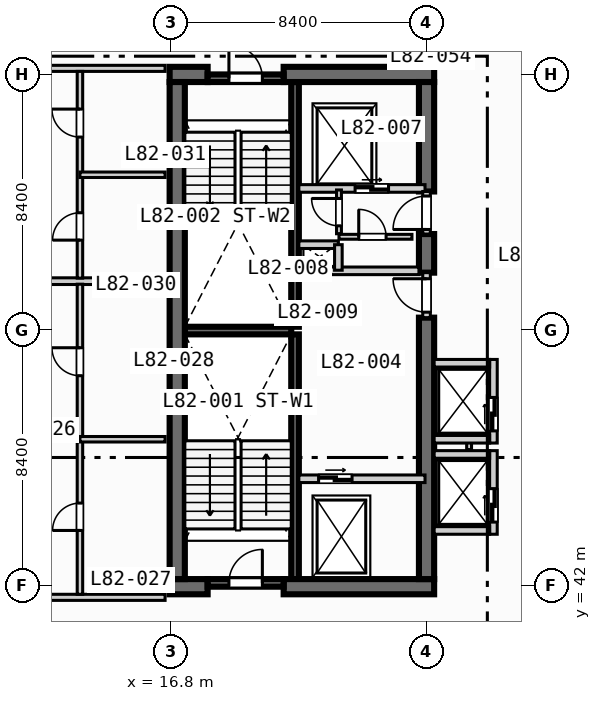
"""IFC4 building model, lengths in metres.
Left out: names, types, materials, properties, quantities, classifications, styles, units other than length and angle.
Written with IfcOpenShell. Run it as: python <this file> out.ifc"""

import sys

from ifc_helpers import new_model, si_unit, direction, frame, frame_2d, origin, place, context, subcontext, project, spatial, rectangle, extrude, element, fill, save


model = new_model("IFC4")
c1 = context("Model", 3, precision=1e-05, world=origin(), true_north=direction((0.0, 1.0)))
c2 = subcontext(c1, "Body", "Model", "MODEL_VIEW")
j1 = project(units=[si_unit("LENGTHUNIT", "METRE"), si_unit("PLANEANGLEUNIT", "RADIAN")], contexts=[c1])
p1 = place(None, origin())
s1 = spatial("IfcSite", under=j1, at=p1, CompositionType="ELEMENT")
p2 = place(p1, origin())
s2 = spatial("IfcBuilding", under=s1, at=p2, CompositionType="ELEMENT")
p3 = place(p2, frame((0.0, 0.0, 332.0)))
s3 = spatial("IfcBuildingStorey", under=s2, at=p3, CompositionType="ELEMENT", Elevation=332.0)
for number, where, z_axis, x_axis in (
    (1, (20.875, 42.2, 0.0), (0.0, 0.0, 1.0), (0.0, 1.0, 0.0)),
    (2, (20.875, 50.5, 0.0), (0.0, 0.0, 1.0), (0.0, 1.0, 0.0)),
):
    element("IfcWall", number, at=place(p3, frame(where, z_axis=z_axis, x_axis=x_axis)), inside=s3, PredefinedType="SOLIDWALL", context=c2, shape_type="SweptSolid", body=[
        extrude(rectangle(XDim=8.05, YDim=0.25, at=frame_2d((4.025, 0.0))), origin(), (0.0, 0.0, 1.0), 3.67),
    ])
p4 = place(p3, frame((17.25, 50.375, 0.0), z_axis=(0.0, 0.0, 1.0), x_axis=(1.0, 0.0, 0.0)))
e3 = element("IfcWall", 3, at=p4, inside=s3, PredefinedType="SOLIDWALL", context=c2, shape_type="SweptSolid", body=[
    extrude(rectangle(XDim=3.5, YDim=0.25, at=frame_2d((1.75, 0.0))), origin(), (0.0, 0.0, 1.0), 3.67),
])
p5 = place(p3, frame((16.75, 41.95, 0.0), z_axis=(0.0, 0.0, 1.0), x_axis=(1.0, 0.0, 0.0)))
e4 = element("IfcWall", 4, at=p5, inside=s3, PredefinedType="SHEAR", context=c2, shape_type="SweptSolid", body=[
    extrude(rectangle(XDim=1.25, YDim=0.5, at=frame_2d((0.625, 0.0))), origin(), (0.0, 0.0, 1.0), 3.67),
])
p6 = place(p3, frame((20.5, 41.95, 0.0), z_axis=(0.0, 0.0, 1.0), x_axis=(1.0, 0.0, 0.0)))
e5 = element("IfcWall", 5, at=p6, inside=s3, PredefinedType="SHEAR", context=c2, shape_type="SweptSolid", body=[
    extrude(rectangle(XDim=4.95, YDim=0.5, at=frame_2d((2.475, 0.0))), origin(), (0.0, 0.0, 1.0), 3.67),
])
p7 = place(p3, frame((16.75, 58.8, 0.0), z_axis=(0.0, 0.0, 1.0), x_axis=(1.0, 0.0, 0.0)))
e6 = element("IfcWall", 6, at=p7, inside=s3, PredefinedType="SHEAR", context=c2, shape_type="SweptSolid", body=[
    extrude(rectangle(XDim=1.25, YDim=0.5, at=frame_2d((0.625, 0.0))), origin(), (0.0, 0.0, 1.0), 3.67),
])
p8 = place(p3, frame((20.5, 58.8, 0.0), z_axis=(0.0, 0.0, 1.0), x_axis=(1.0, 0.0, 0.0)))
e7 = element("IfcWall", 7, at=p8, inside=s3, PredefinedType="SHEAR", context=c2, shape_type="SweptSolid", body=[
    extrude(rectangle(XDim=4.95, YDim=0.5, at=frame_2d((2.475, 0.0))), origin(), (0.0, 0.0, 1.0), 3.67),
])
p9 = place(p3, frame((17.0, 42.2, 0.0), z_axis=(0.0, 0.0, 1.0), x_axis=(0.0, 1.0, 0.0)))
e8 = element("IfcWall", 8, at=p9, inside=s3, PredefinedType="SHEAR", context=c2, shape_type="SweptSolid", body=[
    extrude(rectangle(XDim=16.35, YDim=0.5, at=frame_2d((8.175, 0.0))), origin(), (0.0, 0.0, 1.0), 3.67),
])
p10 = place(p3, frame((25.2, 42.2, 0.0), z_axis=(0.0, 0.0, 1.0), x_axis=(0.0, 1.0, 0.0)))
e9 = element("IfcWall", 9, at=p10, inside=s3, PredefinedType="SHEAR", context=c2, shape_type="SweptSolid", body=[
    extrude(rectangle(XDim=8.6, YDim=0.5, at=frame_2d((4.3, 0.0))), origin(), (0.0, 0.0, 1.0), 3.67),
])
p11 = place(p3, frame((25.2, 52.28, 0.0), z_axis=(0.0, 0.0, 1.0), x_axis=(0.0, 1.0, 0.0)))
e10 = element("IfcWall", 10, at=p11, inside=s3, PredefinedType="SHEAR", context=c2, shape_type="SweptSolid", body=[
    extrude(rectangle(XDim=1.27, YDim=0.5, at=frame_2d((0.635, 0.0))), origin(), (0.0, 0.0, 1.0), 3.67),
])
p12 = place(p3, frame((25.2, 54.95, 0.0), z_axis=(0.0, 0.0, 1.0), x_axis=(0.0, 1.0, 0.0)))
e11 = element("IfcWall", 11, at=p12, inside=s3, PredefinedType="SHEAR", context=c2, shape_type="SweptSolid", body=[
    extrude(rectangle(XDim=3.6, YDim=0.5, at=frame_2d((1.8, 0.0))), origin(), (0.0, 0.0, 1.0), 3.67),
])
p13 = place(p3, frame((18.0, 42.075, 0.0), z_axis=(0.0, 0.0, 1.0), x_axis=(1.0, 0.0, 0.0)))
e12 = element("IfcWall", 12, at=p13, inside=s3, PredefinedType="SOLIDWALL", context=c2, shape_type="SweptSolid", body=[
    extrude(rectangle(XDim=2.5, YDim=0.25, at=frame_2d((1.25, 0.0))), origin(), (0.0, 0.0, 1.0), 3.67),
])
p14 = place(p13, frame((0.7, 0.0, 0.0)))
e13 = element("IfcOpeningElement", 13, at=p14, cuts=e12, PredefinedType="OPENING", context=c2, shape_type="SweptSolid", body=[
    extrude(rectangle(XDim=1.1, YDim=2.15, at=frame_2d((0.55, 1.075))), frame((0.0, 0.135, 0.0), z_axis=(0.0, -1.0, 0.0), x_axis=(1.0, 0.0, 0.0)), (0.0, 0.0, 1.0), 0.27),
])
p15 = place(p3, frame((18.0, 58.675, 0.0), z_axis=(0.0, 0.0, 1.0), x_axis=(1.0, 0.0, 0.0)))
e14 = element("IfcWall", 14, at=p15, inside=s3, PredefinedType="SOLIDWALL", context=c2, shape_type="SweptSolid", body=[
    extrude(rectangle(XDim=2.5, YDim=0.25, at=frame_2d((1.25, 0.0))), origin(), (0.0, 0.0, 1.0), 3.67),
])
p16 = place(p15, frame((0.7, 0.0, 0.0)))
e15 = element("IfcOpeningElement", 15, at=p16, cuts=e14, PredefinedType="OPENING", context=c2, shape_type="SweptSolid", body=[
    extrude(rectangle(XDim=1.1, YDim=2.15, at=frame_2d((0.55, 1.075))), frame((0.0, 0.135, 0.0), z_axis=(0.0, -1.0, 0.0), x_axis=(1.0, 0.0, 0.0)), (0.0, 0.0, 1.0), 0.27),
])
p17 = place(p3, frame((21.0, 45.5, 0.0), z_axis=(0.0, 0.0, 1.0), x_axis=(1.0, 0.0, 0.0)))
e16 = element("IfcWall", 16, at=p17, inside=s3, PredefinedType="SOLIDWALL", context=c2, shape_type="SweptSolid", body=[
    extrude(rectangle(XDim=4.15, YDim=0.25, at=frame_2d((2.075, 0.0))), origin(), (0.0, 0.0, 1.0), 3.67),
])
p18 = place(p17, frame((0.65, 0.0, 0.0)))
e17 = element("IfcOpeningElement", 17, at=p18, cuts=e16, PredefinedType="OPENING", context=c2, shape_type="SweptSolid", body=[
    extrude(rectangle(XDim=1.1, YDim=2.15, at=frame_2d((0.55, 1.075))), frame((0.0, 0.135, 0.0), z_axis=(0.0, -1.0, 0.0), x_axis=(1.0, 0.0, 0.0)), (0.0, 0.0, 1.0), 0.27),
])
p19 = place(p3, frame((25.2, 50.8, 0.0), z_axis=(0.0, 0.0, 1.0), x_axis=(0.0, 1.0, 0.0)))
e18 = element("IfcWall", 18, at=p19, inside=s3, PredefinedType="SOLIDWALL", context=c2, shape_type="SweptSolid", body=[
    extrude(rectangle(XDim=1.48, YDim=0.25, at=frame_2d((0.74, 0.0))), origin(), (0.0, 0.0, 1.0), 3.67),
])
p20 = place(p19, frame((0.18, 0.0, 0.0)))
e19 = element("IfcOpeningElement", 19, at=p20, cuts=e18, PredefinedType="OPENING", context=c2, shape_type="SweptSolid", body=[
    extrude(rectangle(XDim=1.1, YDim=2.15, at=frame_2d((0.55, 1.075))), frame((0.0, 0.135, 0.0), z_axis=(0.0, -1.0, 0.0), x_axis=(1.0, 0.0, 0.0)), (0.0, 0.0, 1.0), 0.27),
])
p21 = place(p3, frame((21.0, 52.34, 0.0), z_axis=(0.0, 0.0, 1.0), x_axis=(1.0, 0.0, 0.0)))
e20 = element("IfcWall", 20, at=p21, inside=s3, PredefinedType="SOLIDWALL", context=c2, shape_type="SweptSolid", body=[
    extrude(rectangle(XDim=3.95, YDim=0.25, at=frame_2d((1.975, 0.0))), origin(), (0.0, 0.0, 1.0), 3.67),
])
p22 = place(p3, frame((21.0, 55.05, 0.0), z_axis=(0.0, 0.0, 1.0), x_axis=(1.0, 0.0, 0.0)))
e21 = element("IfcWall", 21, at=p22, inside=s3, PredefinedType="SOLIDWALL", context=c2, shape_type="SweptSolid", body=[
    extrude(rectangle(XDim=4.15, YDim=0.25, at=frame_2d((2.075, 0.0))), origin(), (0.0, 0.0, 1.0), 3.67),
])
p23 = place(p22, frame((1.85, 0.0, 0.0)))
e22 = element("IfcOpeningElement", 22, at=p23, cuts=e21, PredefinedType="OPENING", context=c2, shape_type="SweptSolid", body=[
    extrude(rectangle(XDim=1.1, YDim=2.15, at=frame_2d((0.55, 1.075))), frame((0.0, 0.135, 0.0), z_axis=(0.0, -1.0, 0.0), x_axis=(1.0, 0.0, 0.0)), (0.0, 0.0, 1.0), 0.27),
])
p24 = place(p3, frame((25.2, 53.55, 0.0), z_axis=(0.0, 0.0, 1.0), x_axis=(0.0, 1.0, 0.0)))
e23 = element("IfcWall", 23, at=p24, inside=s3, PredefinedType="SOLIDWALL", context=c2, shape_type="SweptSolid", body=[
    extrude(rectangle(XDim=1.4, YDim=0.25, at=frame_2d((0.7, 0.0))), origin(), (0.0, 0.0, 1.0), 3.67),
])
p25 = place(p24, frame((0.15, 0.0, 0.0)))
e24 = element("IfcOpeningElement", 24, at=p25, cuts=e23, PredefinedType="OPENING", context=c2, shape_type="SweptSolid", body=[
    extrude(rectangle(XDim=1.1, YDim=2.15, at=frame_2d((0.55, 1.075))), frame((0.0, 0.135, 0.0), z_axis=(0.0, -1.0, 0.0), x_axis=(1.0, 0.0, 0.0)), (0.0, 0.0, 1.0), 0.27),
])
p26 = place(p3, frame((21.0, 53.2, 0.0), z_axis=(0.0, 0.0, 1.0), x_axis=(1.0, 0.0, 0.0)))
e25 = element("IfcWall", 25, at=p26, inside=s3, PredefinedType="SOLIDWALL", context=c2, shape_type="SweptSolid", body=[
    extrude(rectangle(XDim=1.3, YDim=0.25, at=frame_2d((0.65, 0.0))), origin(), (0.0, 0.0, 1.0), 3.67),
])
p27 = place(p3, frame((22.3, 52.36, 0.0), z_axis=(0.0, 0.0, 1.0), x_axis=(0.0, 1.0, 0.0)))
e26 = element("IfcWall", 26, at=p27, inside=s3, PredefinedType="SOLIDWALL", context=c2, shape_type="SweptSolid", body=[
    extrude(rectangle(XDim=0.84, YDim=0.25, at=frame_2d((0.42, 0.0))), origin(), (0.0, 0.0, 1.0), 3.67),
])
p28 = place(p3, frame((22.32, 53.56, 0.0), z_axis=(0.0, 0.0, 1.0), x_axis=(0.0, 1.0, 0.0)))
e27 = element("IfcWall", 27, at=p28, inside=s3, PredefinedType="PARTITIONING", context=c2, shape_type="SweptSolid", body=[
    extrude(rectangle(XDim=1.44, YDim=0.16, at=frame_2d((0.72, 0.0))), origin(), (0.0, 0.0, 1.0), 3.67),
])
p29 = place(p28, frame((0.26, 0.0, 0.0)))
e28 = element("IfcOpeningElement", 28, at=p29, cuts=e27, PredefinedType="OPENING", context=c2, shape_type="SweptSolid", body=[
    extrude(rectangle(XDim=0.9, YDim=2.1, at=frame_2d((0.45, 1.05))), frame((0.0, 0.09, 0.0), z_axis=(0.0, -1.0, 0.0), x_axis=(1.0, 0.0, 0.0)), (0.0, 0.0, 1.0), 0.18),
])
p30 = place(p3, frame((22.32, 53.46, 0.0), z_axis=(0.0, 0.0, 1.0), x_axis=(1.0, 0.0, 0.0)))
e29 = element("IfcWall", 29, at=p30, inside=s3, PredefinedType="PARTITIONING", context=c2, shape_type="SweptSolid", body=[
    extrude(rectangle(XDim=2.4, YDim=0.16, at=frame_2d((1.2, 0.0))), origin(), (0.0, 0.0, 1.0), 3.67),
])
p31 = place(p30, frame((0.65, 0.0, 0.0)))
e30 = element("IfcOpeningElement", 30, at=p31, cuts=e29, PredefinedType="OPENING", context=c2, shape_type="SweptSolid", body=[
    extrude(rectangle(XDim=0.9, YDim=2.1, at=frame_2d((0.45, 1.05))), frame((0.0, 0.09, 0.0), z_axis=(0.0, -1.0, 0.0), x_axis=(1.0, 0.0, 0.0)), (0.0, 0.0, 1.0), 0.18),
])
p32 = place(p3, frame((27.4, 43.675, 0.0), z_axis=(0.0, 0.0, 1.0), x_axis=(0.0, 1.0, 0.0)))
e31 = element("IfcWall", 31, at=p32, inside=s3, PredefinedType="SOLIDWALL", context=c2, shape_type="SweptSolid", body=[
    extrude(rectangle(XDim=2.75, YDim=0.25, at=frame_2d((1.375, 0.0))), origin(), (0.0, 0.0, 1.0), 3.67),
])
p33 = place(p32, frame((0.4, 0.0, 0.0)))
e32 = element("IfcOpeningElement", 32, at=p33, cuts=e31, PredefinedType="OPENING", context=c2, shape_type="SweptSolid", body=[
    extrude(rectangle(XDim=1.1, YDim=2.15, at=frame_2d((0.55, 1.075))), frame((0.0, 0.135, 0.0), z_axis=(0.0, -1.0, 0.0), x_axis=(1.0, 0.0, 0.0)), (0.0, 0.0, 1.0), 0.27),
])
for number, where, z_axis, x_axis in (
    (33, (25.45, 43.8, 0.0), (0.0, 0.0, 1.0), (1.0, 0.0, 0.0)),
    (34, (25.45, 46.3, 0.0), (0.0, 0.0, 1.0), (1.0, 0.0, 0.0)),
):
    element("IfcWall", number, at=place(p3, frame(where, z_axis=z_axis, x_axis=x_axis)), inside=s3, PredefinedType="SOLIDWALL", context=c2, shape_type="SweptSolid", body=[
        extrude(rectangle(XDim=1.825, YDim=0.25, at=frame_2d((0.913, 0.0))), origin(), (0.0, 0.0, 1.0), 3.67),
    ])
p34 = place(p3, frame((26.6, 46.46, 0.0), z_axis=(0.0, 0.0, 1.0), x_axis=(0.0, 1.0, 0.0)))
e35 = element("IfcWall", 35, at=p34, inside=s3, PredefinedType="PARTITIONING", context=c2, shape_type="SweptSolid", body=[
    extrude(rectangle(XDim=0.88, YDim=0.16, at=frame_2d((0.44, 0.0))), origin(), (0.0, 0.0, 1.0), 3.67),
])
p35 = place(p3, frame((27.4, 46.675, 0.0), z_axis=(0.0, 0.0, 1.0), x_axis=(0.0, 1.0, 0.0)))
e36 = element("IfcWall", 36, at=p35, inside=s3, PredefinedType="SOLIDWALL", context=c2, shape_type="SweptSolid", body=[
    extrude(rectangle(XDim=2.75, YDim=0.25, at=frame_2d((1.375, 0.0))), origin(), (0.0, 0.0, 1.0), 3.67),
])
p36 = place(p35, frame((0.4, 0.0, 0.0)))
e37 = element("IfcOpeningElement", 37, at=p36, cuts=e36, PredefinedType="OPENING", context=c2, shape_type="SweptSolid", body=[
    extrude(rectangle(XDim=1.1, YDim=2.15, at=frame_2d((0.55, 1.075))), frame((0.0, 0.135, 0.0), z_axis=(0.0, -1.0, 0.0), x_axis=(1.0, 0.0, 0.0)), (0.0, 0.0, 1.0), 0.27),
])
for number, where, z_axis, x_axis in (
    (38, (25.45, 46.8, 0.0), (0.0, 0.0, 1.0), (1.0, 0.0, 0.0)),
    (39, (25.45, 49.3, 0.0), (0.0, 0.0, 1.0), (1.0, 0.0, 0.0)),
):
    element("IfcWall", number, at=place(p3, frame(where, z_axis=z_axis, x_axis=x_axis)), inside=s3, PredefinedType="SOLIDWALL", context=c2, shape_type="SweptSolid", body=[
        extrude(rectangle(XDim=1.825, YDim=0.25, at=frame_2d((0.913, 0.0))), origin(), (0.0, 0.0, 1.0), 3.67),
    ])
p37 = place(p3, frame((8.65, 41.6, 0.0), z_axis=(0.0, 0.0, 1.0), x_axis=(1.0, 0.0, 0.0)))
e40 = element("IfcWall", 40, at=p37, inside=s3, PredefinedType="PARTITIONING", context=c2, shape_type="SweptSolid", body=[
    extrude(rectangle(XDim=7.95, YDim=0.2, at=frame_2d((3.975, 0.0))), origin(), (0.0, 0.0, 1.0), 3.67),
])
p38 = place(p37, frame((2.0, 0.0, 0.0)))
e41 = element("IfcOpeningElement", 41, at=p38, cuts=e40, PredefinedType="OPENING", context=c2, shape_type="SweptSolid", body=[
    extrude(rectangle(XDim=1.0, YDim=2.15, at=frame_2d((0.5, 1.075))), frame((0.0, 0.11, 0.0), z_axis=(0.0, -1.0, 0.0), x_axis=(1.0, 0.0, 0.0)), (0.0, 0.0, 1.0), 0.22),
])
p39 = place(p3, frame((8.65, 59.0, 0.0), z_axis=(0.0, 0.0, 1.0), x_axis=(1.0, 0.0, 0.0)))
e42 = element("IfcWall", 42, at=p39, inside=s3, PredefinedType="PARTITIONING", context=c2, shape_type="SweptSolid", body=[
    extrude(rectangle(XDim=7.95, YDim=0.2, at=frame_2d((3.975, 0.0))), origin(), (0.0, 0.0, 1.0), 3.07),
])
p40 = place(p39, frame((2.0, 0.0, 0.0)))
e43 = element("IfcOpeningElement", 43, at=p40, cuts=e42, PredefinedType="OPENING", context=c2, shape_type="SweptSolid", body=[
    extrude(rectangle(XDim=1.0, YDim=2.15, at=frame_2d((0.5, 1.075))), frame((0.0, 0.11, 0.0), z_axis=(0.0, -1.0, 0.0), x_axis=(1.0, 0.0, 0.0)), (0.0, 0.0, 1.0), 0.22),
])
p41 = place(p3, frame((8.65, 52.0, 0.0), z_axis=(0.0, 0.0, 1.0), x_axis=(1.0, 0.0, 0.0)))
e44 = element("IfcWall", 44, at=p41, inside=s3, PredefinedType="PARTITIONING", context=c2, shape_type="SweptSolid", body=[
    extrude(rectangle(XDim=7.95, YDim=0.22, at=frame_2d((3.975, 0.0))), origin(), (0.0, 0.0, 1.0), 3.67),
])
p42 = place(p3, frame((13.8, 41.7, 0.0), z_axis=(0.0, 0.0, 1.0), x_axis=(0.0, 1.0, 0.0)))
e45 = element("IfcWall", 45, at=p42, inside=s3, PredefinedType="PLUMBINGWALL", context=c2, shape_type="SweptSolid", body=[
    extrude(rectangle(XDim=10.2, YDim=0.18, at=frame_2d((5.1, 0.0))), origin(), (0.0, 0.0, 1.0), 3.67),
])
p43 = place(p42, frame((2.1, 0.0, 0.0)))
e46 = element("IfcOpeningElement", 46, at=p43, cuts=e45, PredefinedType="OPENING", context=c2, shape_type="SweptSolid", body=[
    extrude(rectangle(XDim=0.9, YDim=2.1, at=frame_2d((0.45, 1.05))), frame((0.0, 0.1, 0.0), z_axis=(0.0, -1.0, 0.0), x_axis=(1.0, 0.0, 0.0)), (0.0, 0.0, 1.0), 0.2),
])
p44 = place(p42, frame((7.19, 0.0, 0.0)))
e47 = element("IfcOpeningElement", 47, at=p44, cuts=e45, PredefinedType="OPENING", context=c2, shape_type="SweptSolid", body=[
    extrude(rectangle(XDim=0.92, YDim=2.1, at=frame_2d((0.46, 1.05))), frame((0.0, 0.1, 0.0), z_axis=(0.0, -1.0, 0.0), x_axis=(1.0, 0.0, 0.0)), (0.0, 0.0, 1.0), 0.2),
])
p45 = place(p3, frame((13.8, 46.8, 0.0), z_axis=(0.0, 0.0, 1.0), x_axis=(1.0, 0.0, 0.0)))
e48 = element("IfcWall", 48, at=p45, inside=s3, PredefinedType="PLUMBINGWALL", context=c2, shape_type="SweptSolid", body=[
    extrude(rectangle(XDim=2.8, YDim=0.18, at=frame_2d((1.4, 0.0))), origin(), (0.0, 0.0, 1.0), 3.67),
])
p46 = place(p3, frame((13.8, 52.1, 0.0), z_axis=(0.0, 0.0, 1.0), x_axis=(0.0, 1.0, 0.0)))
e49 = element("IfcWall", 49, at=p46, inside=s3, PredefinedType="PLUMBINGWALL", context=c2, shape_type="SweptSolid", body=[
    extrude(rectangle(XDim=6.8, YDim=0.18, at=frame_2d((3.4, 0.0))), origin(), (0.0, 0.0, 1.0), 3.67),
])
p47 = place(p46, frame((1.25, 0.0, 0.0)))
e50 = element("IfcOpeningElement", 50, at=p47, cuts=e49, PredefinedType="OPENING", context=c2, shape_type="SweptSolid", body=[
    extrude(rectangle(XDim=0.9, YDim=2.1, at=frame_2d((0.45, 1.05))), frame((0.0, 0.1, 0.0), z_axis=(0.0, -1.0, 0.0), x_axis=(1.0, 0.0, 0.0)), (0.0, 0.0, 1.0), 0.2),
])
p48 = place(p46, frame((4.64, 0.0, 0.0)))
e51 = element("IfcOpeningElement", 51, at=p48, cuts=e49, PredefinedType="OPENING", context=c2, shape_type="SweptSolid", body=[
    extrude(rectangle(XDim=0.92, YDim=2.1, at=frame_2d((0.46, 1.05))), frame((0.0, 0.1, 0.0), z_axis=(0.0, -1.0, 0.0), x_axis=(1.0, 0.0, 0.0)), (0.0, 0.0, 1.0), 0.2),
])
p49 = place(p3, frame((13.8, 55.5, 0.0), z_axis=(0.0, 0.0, 1.0), x_axis=(1.0, 0.0, 0.0)))
e52 = element("IfcWall", 52, at=p49, inside=s3, PredefinedType="PLUMBINGWALL", context=c2, shape_type="SweptSolid", body=[
    extrude(rectangle(XDim=2.8, YDim=0.18, at=frame_2d((1.4, 0.0))), origin(), (0.0, 0.0, 1.0), 3.67),
])
p50 = place(p14, origin())
e53 = element("IfcDoor", 53, at=p50, inside=s3, OperationType="SINGLE_SWING_RIGHT", PredefinedType="DOOR", context=c2, shape_type="SweptSolid", body=[
    extrude(rectangle(XDim=1.1, YDim=2.15, at=frame_2d((0.55, 1.075))), frame((0.0, 0.025, 0.0), z_axis=(0.0, -1.0, 0.0), x_axis=(1.0, 0.0, 0.0)), (0.0, 0.0, 1.0), 0.05),
])
fill(e13, e53)
p51 = place(p16, origin())
e54 = element("IfcDoor", 54, at=p51, inside=s3, OperationType="SINGLE_SWING_LEFT", PredefinedType="DOOR", context=c2, shape_type="SweptSolid", body=[
    extrude(rectangle(XDim=1.1, YDim=2.15, at=frame_2d((0.55, 1.075))), frame((0.0, 0.025, 0.0), z_axis=(0.0, -1.0, 0.0), x_axis=(1.0, 0.0, 0.0)), (0.0, 0.0, 1.0), 0.05),
])
fill(e15, e54)
p52 = place(p18, origin())
e55 = element("IfcDoor", 55, at=p52, inside=s3, OperationType="SLIDING_TO_LEFT", PredefinedType="DOOR", context=c2, shape_type="SweptSolid", body=[
    extrude(rectangle(XDim=1.1, YDim=2.15, at=frame_2d((0.55, 1.075))), frame((0.0, 0.025, 0.0), z_axis=(0.0, -1.0, 0.0), x_axis=(1.0, 0.0, 0.0)), (0.0, 0.0, 1.0), 0.05),
])
fill(e17, e55)
p53 = place(p20, origin())
e56 = element("IfcDoor", 56, at=p53, inside=s3, OperationType="SINGLE_SWING_RIGHT", PredefinedType="DOOR", context=c2, shape_type="SweptSolid", body=[
    extrude(rectangle(XDim=1.1, YDim=2.15, at=frame_2d((0.55, 1.075))), frame((0.0, 0.025, 0.0), z_axis=(0.0, -1.0, 0.0), x_axis=(1.0, 0.0, 0.0)), (0.0, 0.0, 1.0), 0.05),
])
fill(e19, e56)
p54 = place(p23, origin())
e57 = element("IfcDoor", 57, at=p54, inside=s3, OperationType="SLIDING_TO_LEFT", PredefinedType="DOOR", context=c2, shape_type="SweptSolid", body=[
    extrude(rectangle(XDim=1.1, YDim=2.15, at=frame_2d((0.55, 1.075))), frame((0.0, 0.025, 0.0), z_axis=(0.0, -1.0, 0.0), x_axis=(1.0, 0.0, 0.0)), (0.0, 0.0, 1.0), 0.05),
])
fill(e22, e57)
p55 = place(p25, origin())
e58 = element("IfcDoor", 58, at=p55, inside=s3, OperationType="SINGLE_SWING_LEFT", PredefinedType="DOOR", context=c2, shape_type="SweptSolid", body=[
    extrude(rectangle(XDim=1.1, YDim=2.15, at=frame_2d((0.55, 1.075))), frame((0.0, 0.025, 0.0), z_axis=(0.0, -1.0, 0.0), x_axis=(1.0, 0.0, 0.0)), (0.0, 0.0, 1.0), 0.05),
])
fill(e24, e58)
p56 = place(p29, origin())
e59 = element("IfcDoor", 59, at=p56, inside=s3, OperationType="SINGLE_SWING_RIGHT", PredefinedType="DOOR", context=c2, shape_type="SweptSolid", body=[
    extrude(rectangle(XDim=0.9, YDim=2.1, at=frame_2d((0.45, 1.05))), frame((0.0, 0.025, 0.0), z_axis=(0.0, -1.0, 0.0), x_axis=(1.0, 0.0, 0.0)), (0.0, 0.0, 1.0), 0.05),
])
fill(e28, e59)
p57 = place(p31, origin())
e60 = element("IfcDoor", 60, at=p57, inside=s3, OperationType="SINGLE_SWING_LEFT", PredefinedType="DOOR", context=c2, shape_type="SweptSolid", body=[
    extrude(rectangle(XDim=0.9, YDim=2.1, at=frame_2d((0.45, 1.05))), frame((0.0, 0.025, 0.0), z_axis=(0.0, -1.0, 0.0), x_axis=(1.0, 0.0, 0.0)), (0.0, 0.0, 1.0), 0.05),
])
fill(e30, e60)
p58 = place(p33, origin())
e61 = element("IfcDoor", 61, at=p58, inside=s3, OperationType="SLIDING_TO_LEFT", PredefinedType="DOOR", context=c2, shape_type="SweptSolid", body=[
    extrude(rectangle(XDim=1.1, YDim=2.15, at=frame_2d((0.55, 1.075))), frame((0.0, 0.025, 0.0), z_axis=(0.0, -1.0, 0.0), x_axis=(1.0, 0.0, 0.0)), (0.0, 0.0, 1.0), 0.05),
])
fill(e32, e61)
p59 = place(p36, origin())
e62 = element("IfcDoor", 62, at=p59, inside=s3, OperationType="SLIDING_TO_LEFT", PredefinedType="DOOR", context=c2, shape_type="SweptSolid", body=[
    extrude(rectangle(XDim=1.1, YDim=2.15, at=frame_2d((0.55, 1.075))), frame((0.0, 0.025, 0.0), z_axis=(0.0, -1.0, 0.0), x_axis=(1.0, 0.0, 0.0)), (0.0, 0.0, 1.0), 0.05),
])
fill(e37, e62)
p60 = place(p43, origin())
e63 = element("IfcDoor", 63, at=p60, inside=s3, OperationType="SINGLE_SWING_LEFT", PredefinedType="DOOR", context=c2, shape_type="SweptSolid", body=[
    extrude(rectangle(XDim=0.9, YDim=2.1, at=frame_2d((0.45, 1.05))), frame((0.0, 0.025, 0.0), z_axis=(0.0, -1.0, 0.0), x_axis=(1.0, 0.0, 0.0)), (0.0, 0.0, 1.0), 0.05),
])
fill(e46, e63)
p61 = place(p44, origin())
e64 = element("IfcDoor", 64, at=p61, inside=s3, OperationType="SINGLE_SWING_RIGHT", PredefinedType="DOOR", context=c2, shape_type="SweptSolid", body=[
    extrude(rectangle(XDim=0.92, YDim=2.1, at=frame_2d((0.46, 1.05))), frame((0.0, 0.025, 0.0), z_axis=(0.0, -1.0, 0.0), x_axis=(1.0, 0.0, 0.0)), (0.0, 0.0, 1.0), 0.05),
])
fill(e47, e64)
p62 = place(p47, origin())
e65 = element("IfcDoor", 65, at=p62, inside=s3, OperationType="SINGLE_SWING_LEFT", PredefinedType="DOOR", context=c2, shape_type="SweptSolid", body=[
    extrude(rectangle(XDim=0.9, YDim=2.1, at=frame_2d((0.45, 1.05))), frame((0.0, 0.025, 0.0), z_axis=(0.0, -1.0, 0.0), x_axis=(1.0, 0.0, 0.0)), (0.0, 0.0, 1.0), 0.05),
])
fill(e50, e65)
p63 = place(p48, origin())
e66 = element("IfcDoor", 66, at=p63, inside=s3, OperationType="SINGLE_SWING_RIGHT", PredefinedType="DOOR", context=c2, shape_type="SweptSolid", body=[
    extrude(rectangle(XDim=0.92, YDim=2.1, at=frame_2d((0.46, 1.05))), frame((0.0, 0.025, 0.0), z_axis=(0.0, -1.0, 0.0), x_axis=(1.0, 0.0, 0.0)), (0.0, 0.0, 1.0), 0.05),
])
fill(e51, e66)
save(model, sys.argv[1])
